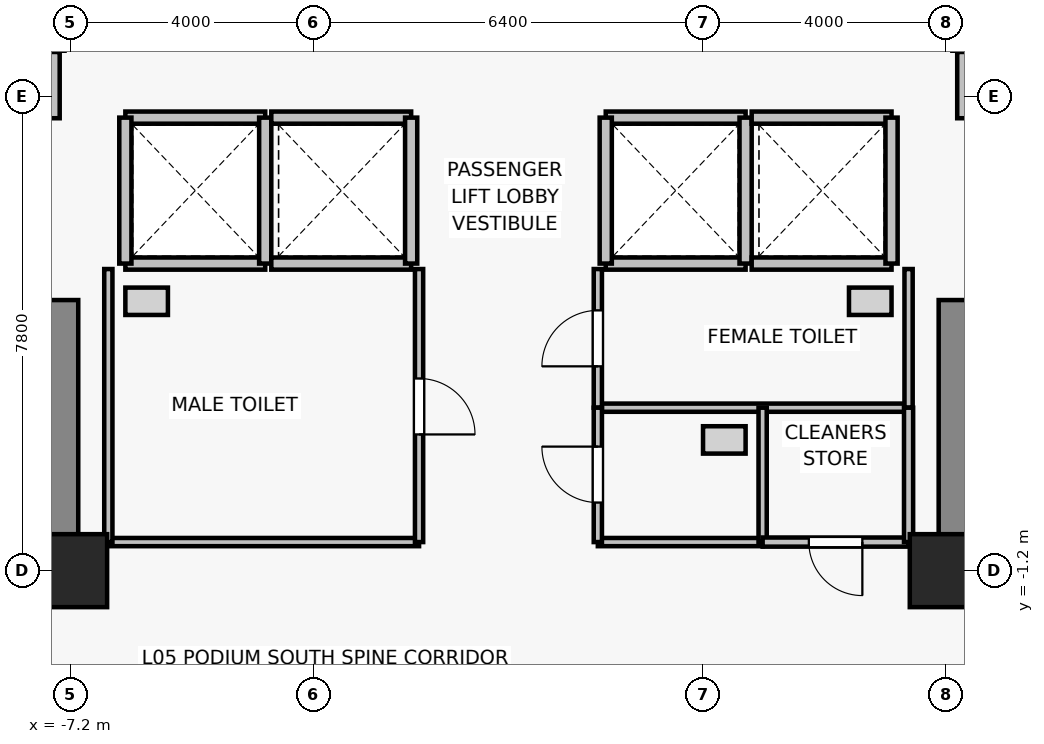
"""IFC4 building model, lengths in metres.
Left out: names, types, materials, properties, quantities, classifications, styles, units other than length and angle.
Written with IfcOpenShell. Run it as: python <this file> out.ifc"""

import sys

from ifc_helpers import new_model, si_unit, direction, frame, frame_2d, origin, origin_2d, place, context, subcontext, project, spatial, rectangle, extrude, source, transform, mapped, element, fill, save


model = new_model("IFC4")
c1 = context("Model", 3, precision=1e-05, world=origin(), true_north=direction((0.0, 1.0)))
c2 = subcontext(c1, "Body", "Model", "MODEL_VIEW")
j1 = project(units=[si_unit("LENGTHUNIT", "METRE"), si_unit("PLANEANGLEUNIT", "RADIAN")], contexts=[c1])
p1 = place(None, origin())
s1 = spatial("IfcSite", under=j1, at=p1, CompositionType="ELEMENT")
p2 = place(p1, origin())
s2 = spatial("IfcBuilding", under=s1, at=p2, CompositionType="ELEMENT")
p3 = place(p2, frame((0.0, 0.0, 22.6)))
s3 = spatial("IfcBuildingStorey", under=s2, at=p3, CompositionType="ELEMENT", Elevation=22.6)
for number, where, z_axis, x_axis in (
    (1, (-7.2, -1.2, 0.0), (0.0, 0.0, 1.0), (1.0, 0.0, 0.0)),
    (2, (7.2, -1.2, 0.0), (0.0, 0.0, 1.0), (1.0, 0.0, 0.0)),
):
    element("IfcColumn", number, at=place(p3, frame(where, z_axis=z_axis, x_axis=x_axis)), inside=s3, PredefinedType="COLUMN", context=c2, shape_type="SweptSolid", body=[
        extrude(rectangle(XDim=1.2, YDim=1.2, at=origin_2d()), origin(), (0.0, 0.0, 1.0), 4.8),
    ])
for number, where, z_axis, x_axis in (
    (3, (-7.4, -0.75, 0.0), (0.0, 0.0, 1.0), (0.0, 1.0, 0.0)),
    (4, (7.4, -0.75, 0.0), (0.0, 0.0, 1.0), (0.0, 1.0, 0.0)),
):
    element("IfcWall", number, at=place(p3, frame(where, z_axis=z_axis, x_axis=x_axis)), inside=s3, PredefinedType="SHEAR", context=c2, shape_type="SweptSolid", body=[
        extrude(rectangle(XDim=4.0, YDim=0.65, at=frame_2d((2.0, 0.0))), origin(), (0.0, 0.0, 1.0), 4.55),
    ])
for number, where, z_axis, x_axis in (
    (5, (-4.0, 3.85, 0.0), (0.0, 0.0, 1.0), (-1.0, 0.0, 0.0)),
    (6, (-6.3, 6.25, 0.0), (0.0, 0.0, 1.0), (1.0, 0.0, 0.0)),
):
    element("IfcWall", number, at=place(p3, frame(where, z_axis=z_axis, x_axis=x_axis)), inside=s3, PredefinedType="SOLIDWALL", context=c2, shape_type="SweptSolid", body=[
        extrude(rectangle(XDim=2.3, YDim=0.2, at=frame_2d((1.15, 0.0))), origin(), (0.0, 0.0, 1.0), 4.55),
    ])
for number, where, z_axis, x_axis in (
    (7, (-6.3, 3.85, 0.0), (0.0, 0.0, 1.0), (0.0, 1.0, 0.0)),
    (8, (-4.0, 6.25, 0.0), (0.0, 0.0, 1.0), (0.0, -1.0, 0.0)),
):
    element("IfcWall", number, at=place(p3, frame(where, z_axis=z_axis, x_axis=x_axis)), inside=s3, PredefinedType="SOLIDWALL", context=c2, shape_type="SweptSolid", body=[
        extrude(rectangle(XDim=2.4, YDim=0.2, at=frame_2d((1.2, 0.0))), origin(), (0.0, 0.0, 1.0), 4.55),
    ])
for number, where, z_axis, x_axis in (
    (9, (-1.6, 3.85, 0.0), (0.0, 0.0, 1.0), (-1.0, 0.0, 0.0)),
    (10, (-3.9, 6.25, 0.0), (0.0, 0.0, 1.0), (1.0, 0.0, 0.0)),
):
    element("IfcWall", number, at=place(p3, frame(where, z_axis=z_axis, x_axis=x_axis)), inside=s3, PredefinedType="SOLIDWALL", context=c2, shape_type="SweptSolid", body=[
        extrude(rectangle(XDim=2.3, YDim=0.2, at=frame_2d((1.15, 0.0))), origin(), (0.0, 0.0, 1.0), 4.55),
    ])
p4 = place(p3, frame((-1.6, 6.25, 0.0), z_axis=(0.0, 0.0, 1.0), x_axis=(0.0, -1.0, 0.0)))
e11 = element("IfcWall", 11, at=p4, inside=s3, PredefinedType="SOLIDWALL", context=c2, shape_type="SweptSolid", body=[
    extrude(rectangle(XDim=2.4, YDim=0.2, at=frame_2d((1.2, 0.0))), origin(), (0.0, 0.0, 1.0), 4.55),
])
for number, where, z_axis, x_axis in (
    (12, (3.9, 3.85, 0.0), (0.0, 0.0, 1.0), (-1.0, 0.0, 0.0)),
    (13, (1.6, 6.25, 0.0), (0.0, 0.0, 1.0), (1.0, 0.0, 0.0)),
):
    element("IfcWall", number, at=place(p3, frame(where, z_axis=z_axis, x_axis=x_axis)), inside=s3, PredefinedType="SOLIDWALL", context=c2, shape_type="SweptSolid", body=[
        extrude(rectangle(XDim=2.3, YDim=0.2, at=frame_2d((1.15, 0.0))), origin(), (0.0, 0.0, 1.0), 4.55),
    ])
for number, where, z_axis, x_axis in (
    (14, (1.6, 3.85, 0.0), (0.0, 0.0, 1.0), (0.0, 1.0, 0.0)),
    (15, (3.9, 6.25, 0.0), (0.0, 0.0, 1.0), (0.0, -1.0, 0.0)),
):
    element("IfcWall", number, at=place(p3, frame(where, z_axis=z_axis, x_axis=x_axis)), inside=s3, PredefinedType="SOLIDWALL", context=c2, shape_type="SweptSolid", body=[
        extrude(rectangle(XDim=2.4, YDim=0.2, at=frame_2d((1.2, 0.0))), origin(), (0.0, 0.0, 1.0), 4.55),
    ])
for number, where, z_axis, x_axis in (
    (16, (6.3, 3.85, 0.0), (0.0, 0.0, 1.0), (-1.0, 0.0, 0.0)),
    (17, (4.0, 6.25, 0.0), (0.0, 0.0, 1.0), (1.0, 0.0, 0.0)),
):
    element("IfcWall", number, at=place(p3, frame(where, z_axis=z_axis, x_axis=x_axis)), inside=s3, PredefinedType="SOLIDWALL", context=c2, shape_type="SweptSolid", body=[
        extrude(rectangle(XDim=2.3, YDim=0.2, at=frame_2d((1.15, 0.0))), origin(), (0.0, 0.0, 1.0), 4.55),
    ])
p5 = place(p3, frame((6.3, 6.25, 0.0), z_axis=(0.0, 0.0, 1.0), x_axis=(0.0, -1.0, 0.0)))
e18 = element("IfcWall", 18, at=p5, inside=s3, PredefinedType="SOLIDWALL", context=c2, shape_type="SweptSolid", body=[
    extrude(rectangle(XDim=2.4, YDim=0.2, at=frame_2d((1.2, 0.0))), origin(), (0.0, 0.0, 1.0), 4.55),
])
for number, where, z_axis, x_axis in (
    (19, (-7.4, 7.35, 0.0), (0.0, 0.0, 1.0), (-1.0, 0.0, 0.0)),
    (20, (9.6, 7.35, 0.0), (0.0, 0.0, 1.0), (-1.0, 0.0, 0.0)),
):
    element("IfcWall", number, at=place(p3, frame(where, z_axis=z_axis, x_axis=x_axis)), inside=s3, PredefinedType="SOLIDWALL", context=c2, shape_type="SweptSolid", body=[
        extrude(rectangle(XDim=2.2, YDim=0.2, at=frame_2d((1.1, 0.0))), origin(), (0.0, 0.0, 1.0), 3.09),
    ])
for number, where, z_axis, x_axis in (
    (21, (-7.47, 7.33, 0.0), (0.0, 0.0, 1.0), (0.0, -1.0, 0.0)),
    (22, (7.47, 6.24, 0.0), (0.0, 0.0, 1.0), (0.0, 1.0, 0.0)),
):
    element("IfcWall", number, at=place(p3, frame(where, z_axis=z_axis, x_axis=x_axis)), inside=s3, PredefinedType="PARTITIONING", context=c2, shape_type="SweptSolid", body=[
        extrude(rectangle(XDim=1.09, YDim=0.18, at=frame_2d((0.545, 0.0))), origin(), (0.0, 0.0, 1.0), 3.09),
    ])
p6 = place(p3, frame((-1.47, -0.73, 0.0), z_axis=(0.0, 0.0, 1.0), x_axis=(-1.0, 0.0, 0.0)))
e23 = element("IfcWall", 23, at=p6, inside=s3, PredefinedType="PARTITIONING", context=c2, shape_type="SweptSolid", body=[
    extrude(rectangle(XDim=5.11, YDim=0.135, at=frame_2d((2.555, 0.0))), origin(), (0.0, 0.0, 1.0), 4.55),
])
p7 = place(p3, frame((-6.58, -0.73, 0.0), z_axis=(0.0, 0.0, 1.0), x_axis=(0.0, 1.0, 0.0)))
e24 = element("IfcWall", 24, at=p7, inside=s3, PredefinedType="PARTITIONING", context=c2, shape_type="SweptSolid", body=[
    extrude(rectangle(XDim=4.49, YDim=0.135, at=frame_2d((2.245, 0.0))), origin(), (0.0, 0.0, 1.0), 4.55),
])
p8 = place(p3, frame((-1.47, 3.76, 0.0), z_axis=(0.0, 0.0, 1.0), x_axis=(0.0, -1.0, 0.0)))
e25 = element("IfcWall", 25, at=p8, inside=s3, PredefinedType="PARTITIONING", context=c2, shape_type="SweptSolid", body=[
    extrude(rectangle(XDim=4.49, YDim=0.135, at=frame_2d((2.245, 0.0))), origin(), (0.0, 0.0, 1.0), 4.55),
])
p9 = place(p8, frame((1.8, 0.0, 0.0)))
e26 = element("IfcOpeningElement", 26, at=p9, cuts=e25, PredefinedType="OPENING", context=c2, shape_type="SweptSolid", body=[
    extrude(rectangle(XDim=0.92, YDim=2.1, at=frame_2d((0.46, 1.05))), frame((0.0, 0.077, 0.0), z_axis=(0.0, -1.0, 0.0), x_axis=(1.0, 0.0, 0.0)), (0.0, 0.0, 1.0), 0.155),
])
p10 = place(p3, frame((6.58, 1.48, 0.0), z_axis=(0.0, 0.0, 1.0), x_axis=(-1.0, 0.0, 0.0)))
e27 = element("IfcWall", 27, at=p10, inside=s3, PredefinedType="PARTITIONING", context=c2, shape_type="SweptSolid", body=[
    extrude(rectangle(XDim=5.11, YDim=0.135, at=frame_2d((2.555, 0.0))), origin(), (0.0, 0.0, 1.0), 4.55),
])
p11 = place(p3, frame((1.47, 1.48, 0.0), z_axis=(0.0, 0.0, 1.0), x_axis=(0.0, 1.0, 0.0)))
e28 = element("IfcWall", 28, at=p11, inside=s3, PredefinedType="PARTITIONING", context=c2, shape_type="SweptSolid", body=[
    extrude(rectangle(XDim=2.28, YDim=0.135, at=frame_2d((1.14, 0.0))), origin(), (0.0, 0.0, 1.0), 4.55),
])
p12 = place(p11, frame((0.68, 0.0, 0.0)))
e29 = element("IfcOpeningElement", 29, at=p12, cuts=e28, PredefinedType="OPENING", context=c2, shape_type="SweptSolid", body=[
    extrude(rectangle(XDim=0.92, YDim=2.1, at=frame_2d((0.46, 1.05))), frame((0.0, 0.077, 0.0), z_axis=(0.0, -1.0, 0.0), x_axis=(1.0, 0.0, 0.0)), (0.0, 0.0, 1.0), 0.155),
])
p13 = place(p3, frame((6.58, 3.76, 0.0), z_axis=(0.0, 0.0, 1.0), x_axis=(0.0, -1.0, 0.0)))
e30 = element("IfcWall", 30, at=p13, inside=s3, PredefinedType="PARTITIONING", context=c2, shape_type="SweptSolid", body=[
    extrude(rectangle(XDim=2.28, YDim=0.135, at=frame_2d((1.14, 0.0))), origin(), (0.0, 0.0, 1.0), 4.55),
])
p14 = place(p3, frame((4.18, -0.73, 0.0), z_axis=(0.0, 0.0, 1.0), x_axis=(-1.0, 0.0, 0.0)))
e31 = element("IfcWall", 31, at=p14, inside=s3, PredefinedType="PARTITIONING", context=c2, shape_type="SweptSolid", body=[
    extrude(rectangle(XDim=2.71, YDim=0.135, at=frame_2d((1.355, 0.0))), origin(), (0.0, 0.0, 1.0), 4.55),
])
p15 = place(p3, frame((1.47, -0.73, 0.0), z_axis=(0.0, 0.0, 1.0), x_axis=(0.0, 1.0, 0.0)))
e32 = element("IfcWall", 32, at=p15, inside=s3, PredefinedType="PARTITIONING", context=c2, shape_type="SweptSolid", body=[
    extrude(rectangle(XDim=2.21, YDim=0.135, at=frame_2d((1.105, 0.0))), origin(), (0.0, 0.0, 1.0), 4.55),
])
p16 = place(p15, frame((0.65, 0.0, 0.0)))
e33 = element("IfcOpeningElement", 33, at=p16, cuts=e32, PredefinedType="OPENING", context=c2, shape_type="SweptSolid", body=[
    extrude(rectangle(XDim=0.92, YDim=2.1, at=frame_2d((0.46, 1.05))), frame((0.0, 0.077, 0.0), z_axis=(0.0, -1.0, 0.0), x_axis=(1.0, 0.0, 0.0)), (0.0, 0.0, 1.0), 0.155),
])
p17 = place(p3, frame((4.18, 1.48, 0.0), z_axis=(0.0, 0.0, 1.0), x_axis=(0.0, -1.0, 0.0)))
e34 = element("IfcWall", 34, at=p17, inside=s3, PredefinedType="PARTITIONING", context=c2, shape_type="SweptSolid", body=[
    extrude(rectangle(XDim=2.21, YDim=0.135, at=frame_2d((1.105, 0.0))), origin(), (0.0, 0.0, 1.0), 4.55),
])
p18 = place(p3, frame((6.58, -0.73, 0.0), z_axis=(0.0, 0.0, 1.0), x_axis=(-1.0, 0.0, 0.0)))
e35 = element("IfcWall", 35, at=p18, inside=s3, PredefinedType="PARTITIONING", context=c2, shape_type="SweptSolid", body=[
    extrude(rectangle(XDim=2.4, YDim=0.15, at=frame_2d((1.2, 0.0))), origin(), (0.0, 0.0, 1.0), 4.55),
])
p19 = place(p18, frame((0.76, 0.0, 0.0)))
e36 = element("IfcOpeningElement", 36, at=p19, cuts=e35, PredefinedType="OPENING", context=c2, shape_type="SweptSolid", body=[
    extrude(rectangle(XDim=0.88, YDim=2.1, at=frame_2d((0.44, 1.05))), frame((0.0, 0.085, 0.0), z_axis=(0.0, -1.0, 0.0), x_axis=(1.0, 0.0, 0.0)), (0.0, 0.0, 1.0), 0.17),
])
p20 = place(p3, frame((6.58, 1.48, 0.0), z_axis=(0.0, 0.0, 1.0), x_axis=(0.0, -1.0, 0.0)))
e37 = element("IfcWall", 37, at=p20, inside=s3, PredefinedType="PARTITIONING", context=c2, shape_type="SweptSolid", body=[
    extrude(rectangle(XDim=2.21, YDim=0.15, at=frame_2d((1.105, 0.0))), origin(), (0.0, 0.0, 1.0), 4.55),
])
m1 = source(origin(), c2, "Body", "SweptSolid", [
    extrude(rectangle(XDim=0.92, YDim=2.1, at=frame_2d((0.46, 1.05))), frame((0.0, 0.025, 0.0), z_axis=(0.0, -1.0, 0.0), x_axis=(1.0, 0.0, 0.0)), (0.0, 0.0, 1.0), 0.05),
])
p21 = place(p9, origin())
e38 = element("IfcDoor", 38, at=p21, inside=s3, OperationType="SINGLE_SWING_RIGHT", PredefinedType="DOOR", context=c2, shape_type="MappedRepresentation", body=[
    mapped(m1, transform((0.0, 0.0, 0.0), x_axis=(1.0, 0.0, 0.0), y_axis=(0.0, 1.0, 0.0), z_axis=(0.0, 0.0, 1.0), scale=1.0)),
])
fill(e26, e38)
p22 = place(p12, origin())
e39 = element("IfcDoor", 39, at=p22, inside=s3, OperationType="SINGLE_SWING_LEFT", PredefinedType="DOOR", context=c2, shape_type="MappedRepresentation", body=[
    mapped(m1, transform((0.0, 0.0, 0.0), x_axis=(1.0, 0.0, 0.0), y_axis=(0.0, 1.0, 0.0), z_axis=(0.0, 0.0, 1.0), scale=1.0)),
])
fill(e29, e39)
p23 = place(p16, origin())
e40 = element("IfcDoor", 40, at=p23, inside=s3, OperationType="SINGLE_SWING_RIGHT", PredefinedType="DOOR", context=c2, shape_type="MappedRepresentation", body=[
    mapped(m1, transform((0.0, 0.0, 0.0), x_axis=(1.0, 0.0, 0.0), y_axis=(0.0, 1.0, 0.0), z_axis=(0.0, 0.0, 1.0), scale=1.0)),
])
fill(e33, e40)
m2 = source(origin(), c2, "Body", "SweptSolid", [
    extrude(rectangle(XDim=0.88, YDim=2.1, at=frame_2d((0.44, 1.05))), frame((0.0, 0.025, 0.0), z_axis=(0.0, -1.0, 0.0), x_axis=(1.0, 0.0, 0.0)), (0.0, 0.0, 1.0), 0.05),
])
p24 = place(p19, origin())
e41 = element("IfcDoor", 41, at=p24, inside=s3, OperationType="SINGLE_SWING_LEFT", PredefinedType="DOOR", context=c2, shape_type="MappedRepresentation", body=[
    mapped(m2, transform((0.0, 0.0, 0.0), x_axis=(1.0, 0.0, 0.0), y_axis=(0.0, 1.0, 0.0), z_axis=(0.0, 0.0, 1.0), scale=1.0)),
])
fill(e36, e41)
save(model, sys.argv[1])
